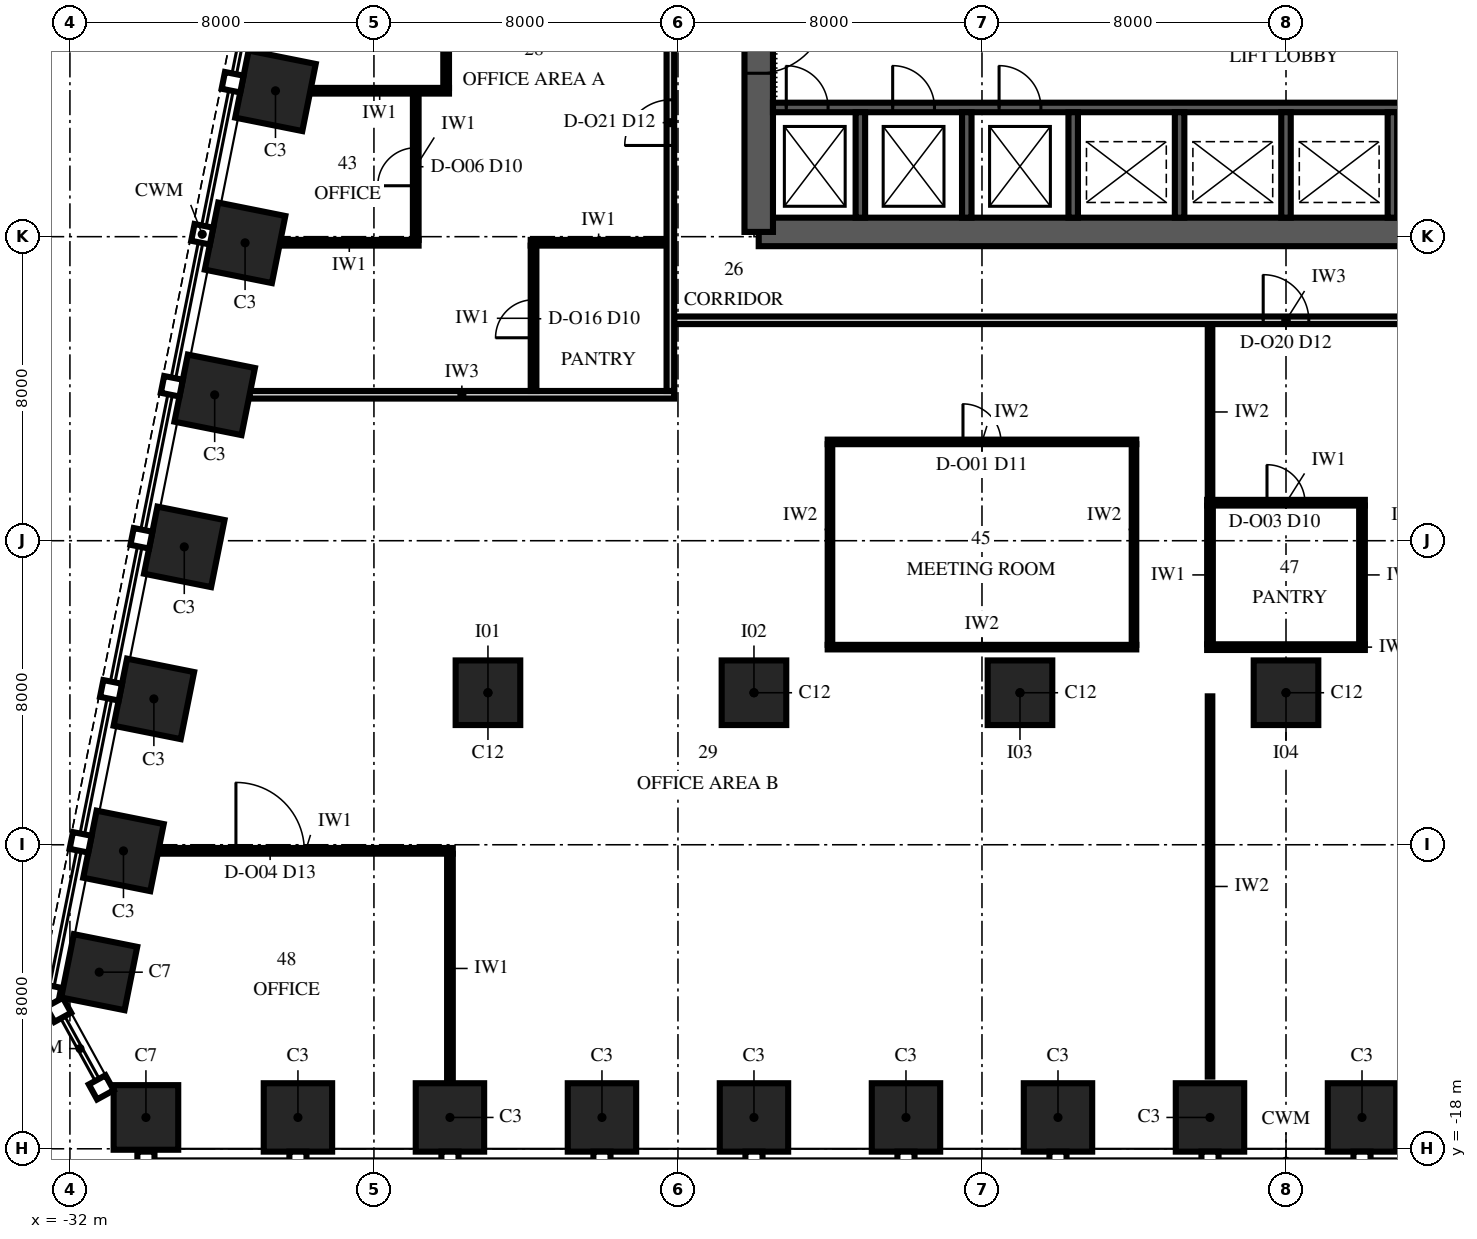
"""IFC4 building model, lengths in metres.
Left out: names, types, materials, properties, quantities, classifications, styles, units other than length and angle.
Written with IfcOpenShell. Run it as: python <this file> out.ifc"""

import sys

from ifc_helpers import new_model, si_unit, direction, frame, frame_2d, origin, origin_2d, place, context, subcontext, project, spatial, polyline, rectangle, outline, extrude, element, fill, save


model = new_model("IFC4")
c1 = context("Model", 3, precision=1e-05, world=origin(), true_north=direction((0.0, 1.0)))
c2 = subcontext(c1, "Body", "Model", "MODEL_VIEW")
j1 = project(units=[si_unit("LENGTHUNIT", "METRE"), si_unit("PLANEANGLEUNIT", "RADIAN")], contexts=[c1])
p1 = place(None, origin())
s1 = spatial("IfcSite", under=j1, at=p1, CompositionType="ELEMENT")
p2 = place(p1, origin())
s2 = spatial("IfcBuilding", under=s1, at=p2, CompositionType="ELEMENT")
p3 = place(p2, frame((0.0, 0.0, 115.0)))
s3 = spatial("IfcBuildingStorey", under=s2, at=p3, CompositionType="ELEMENT", Elevation=115.0)
p4 = place(p3, frame((-30.0, -17.175, 0.0), z_axis=(0.0, 0.0, 1.0), x_axis=(1.0, 0.0, 0.0)))
e1 = element("IfcColumn", 1, at=p4, inside=s3, PredefinedType="COLUMN", context=c2, shape_type="SweptSolid", body=[
    extrude(rectangle(XDim=1.7, YDim=1.7, at=origin_2d()), origin(), (0.0, 0.0, 1.0), 4.0),
])
for number, where, z_axis, x_axis in (
    (2, (-26.0, -17.175, 0.0), (0.0, 0.0, 1.0), (1.0, 0.0, 0.0)),
    (3, (-22.0, -17.175, 0.0), (0.0, 0.0, 1.0), (1.0, 0.0, 0.0)),
    (4, (-18.0, -17.175, 0.0), (0.0, 0.0, 1.0), (1.0, 0.0, 0.0)),
    (5, (-14.0, -17.175, 0.0), (0.0, 0.0, 1.0), (1.0, 0.0, 0.0)),
    (6, (-10.0, -17.175, 0.0), (0.0, 0.0, 1.0), (1.0, 0.0, 0.0)),
    (7, (-6.0, -17.175, 0.0), (0.0, 0.0, 1.0), (1.0, 0.0, 0.0)),
    (8, (-2.0, -17.175, 0.0), (0.0, 0.0, 1.0), (1.0, 0.0, 0.0)),
    (9, (2.0, -17.175, 0.0), (0.0, 0.0, 1.0), (1.0, 0.0, 0.0)),
    (10, (-26.591, 9.838, 0.0), (0.0, 0.0, 1.0), (-0.196, -0.981, 0.0)),
    (11, (-27.391, 5.838, 0.0), (0.0, 0.0, 1.0), (-0.196, -0.981, 0.0)),
    (12, (-28.191, 1.838, 0.0), (0.0, 0.0, 1.0), (-0.196, -0.981, 0.0)),
    (13, (-28.991, -2.162, 0.0), (0.0, 0.0, 1.0), (-0.196, -0.981, 0.0)),
    (14, (-29.791, -6.162, 0.0), (0.0, 0.0, 1.0), (-0.196, -0.981, 0.0)),
    (15, (-30.591, -10.162, 0.0), (0.0, 0.0, 1.0), (-0.196, -0.981, 0.0)),
):
    element("IfcColumn", number, at=place(p3, frame(where, z_axis=z_axis, x_axis=x_axis)), inside=s3, PredefinedType="COLUMN", context=c2, shape_type="SweptSolid", body=[
        extrude(rectangle(XDim=1.8, YDim=1.8, at=origin_2d()), origin(), (0.0, 0.0, 1.0), 4.0),
    ])
for number, where, z_axis, x_axis in (
    (16, (-31.229, -13.353, 0.0), (0.0, 0.0, 1.0), (-0.196, -0.981, 0.0)),
    (17, (-21.0, -6.0, 0.0), (0.0, 0.0, 1.0), (1.0, 0.0, 0.0)),
    (18, (-14.0, -6.0, 0.0), (0.0, 0.0, 1.0), (1.0, 0.0, 0.0)),
    (19, (-7.0, -6.0, 0.0), (0.0, 0.0, 1.0), (1.0, 0.0, 0.0)),
    (20, (0.0, -6.0, 0.0), (0.0, 0.0, 1.0), (1.0, 0.0, 0.0)),
):
    element("IfcColumn", number, at=place(p3, frame(where, z_axis=z_axis, x_axis=x_axis)), inside=s3, PredefinedType="COLUMN", context=c2, shape_type="SweptSolid", body=[
        extrude(rectangle(XDim=1.7, YDim=1.7, at=origin_2d()), origin(), (0.0, 0.0, 1.0), 4.0),
    ])
p5 = place(p3, frame((-13.875, 6.125, 0.0), z_axis=(0.0, 0.0, 1.0), x_axis=(1.0, 0.0, 0.0)))
e21 = element("IfcWall", 21, at=p5, inside=s3, PredefinedType="SHEAR", context=c2, shape_type="SweptSolid", body=[
    extrude(rectangle(XDim=27.75, YDim=0.75, at=frame_2d((13.875, 0.0))), origin(), (0.0, 0.0, 1.0), 4.0),
])
p6 = place(p3, frame((-13.875, 23.875, 0.0), z_axis=(0.0, 0.0, 1.0), x_axis=(0.0, -1.0, 0.0)))
e22 = element("IfcWall", 22, at=p6, inside=s3, PredefinedType="SHEAR", context=c2, shape_type="SweptSolid", body=[
    extrude(outline(polyline([(0.0, -0.375), (17.75, -0.375), (17.75, 0.0), (17.375, 0.0), (17.375, 0.375), (0.375, 0.375), (0.375, 0.0), (0.0, 0.0), (0.0, -0.375)])), origin(), (0.0, 0.0, 1.0), 4.0),
])
p7 = place(p6, frame((11.775, 0.0, 0.0)))
e23 = element("IfcOpeningElement", 23, at=p7, cuts=e22, PredefinedType="OPENING", context=c2, shape_type="SweptSolid", body=[
    extrude(rectangle(XDim=1.8, YDim=2.4, at=frame_2d((0.9, 1.2))), frame((0.0, 0.39, 0.0), z_axis=(0.0, -1.0, 0.0), x_axis=(1.0, 0.0, 0.0)), (0.0, 0.0, 1.0), 0.78),
])
p8 = place(p3, frame((-13.5, 9.4, 0.0), z_axis=(0.0, 0.0, 1.0), x_axis=(1.0, 0.0, 0.0)))
e24 = element("IfcWall", 24, at=p8, inside=s3, PredefinedType="SHEAR", context=c2, shape_type="SweptSolid", body=[
    extrude(rectangle(XDim=27.0, YDim=0.25, at=frame_2d((13.5, 0.0))), origin(), (0.0, 0.0, 1.0), 4.0),
])
p9 = place(p8, frame((0.35, 0.0, 0.0)))
e25 = element("IfcOpeningElement", 25, at=p9, cuts=e24, PredefinedType="OPENING", context=c2, shape_type="SweptSolid", body=[
    extrude(rectangle(XDim=1.1, YDim=2.1, at=frame_2d((0.55, 1.05))), frame((0.0, 0.14, 0.0), z_axis=(0.0, -1.0, 0.0), x_axis=(1.0, 0.0, 0.0)), (0.0, 0.0, 1.0), 0.28),
])
p10 = place(p8, frame((3.15, 0.0, 0.0)))
e26 = element("IfcOpeningElement", 26, at=p10, cuts=e24, PredefinedType="OPENING", context=c2, shape_type="SweptSolid", body=[
    extrude(rectangle(XDim=1.1, YDim=2.1, at=frame_2d((0.55, 1.05))), frame((0.0, 0.14, 0.0), z_axis=(0.0, -1.0, 0.0), x_axis=(1.0, 0.0, 0.0)), (0.0, 0.0, 1.0), 0.28),
])
p11 = place(p8, frame((5.95, 0.0, 0.0)))
e27 = element("IfcOpeningElement", 27, at=p11, cuts=e24, PredefinedType="OPENING", context=c2, shape_type="SweptSolid", body=[
    extrude(rectangle(XDim=1.1, YDim=2.1, at=frame_2d((0.55, 1.05))), frame((0.0, 0.14, 0.0), z_axis=(0.0, -1.0, 0.0), x_axis=(1.0, 0.0, 0.0)), (0.0, 0.0, 1.0), 0.28),
])
for number, where, z_axis, x_axis in (
    (28, (-11.2, 6.5, 0.0), (0.0, 0.0, 1.0), (0.0, 1.0, 0.0)),
    (29, (-8.4, 6.5, 0.0), (0.0, 0.0, 1.0), (0.0, 1.0, 0.0)),
    (30, (-5.6, 6.5, 0.0), (0.0, 0.0, 1.0), (0.0, 1.0, 0.0)),
    (31, (-2.8, 6.5, 0.0), (0.0, 0.0, 1.0), (0.0, 1.0, 0.0)),
    (32, (0.0, 6.5, 0.0), (0.0, 0.0, 1.0), (0.0, 1.0, 0.0)),
    (33, (2.8, 6.5, 0.0), (0.0, 0.0, 1.0), (0.0, 1.0, 0.0)),
):
    element("IfcWall", number, at=place(p3, frame(where, z_axis=z_axis, x_axis=x_axis)), inside=s3, PredefinedType="SHEAR", context=c2, shape_type="SweptSolid", body=[
        extrude(rectangle(XDim=2.775, YDim=0.25, at=frame_2d((1.387, 0.0))), origin(), (0.0, 0.0, 1.0), 4.0),
    ])
p12 = place(p3, frame((-29.673, -10.16, 0.0), z_axis=(0.0, 0.0, 1.0), x_axis=(1.0, 0.0, 0.0)))
e34 = element("IfcWall", 34, at=p12, inside=s3, PredefinedType="PARTITIONING", context=c2, shape_type="SweptSolid", body=[
    extrude(rectangle(XDim=7.748, YDim=0.15, at=frame_2d((3.874, 0.0))), origin(), (0.0, 0.0, 1.0), 3.25),
])
p13 = place(p12, frame((2.041, 0.0, 0.0)))
e35 = element("IfcOpeningElement", 35, at=p13, cuts=e34, PredefinedType="OPENING", context=c2, shape_type="SweptSolid", body=[
    extrude(rectangle(XDim=1.8, YDim=2.4, at=frame_2d((0.9, 1.2))), frame((0.0, 0.09, 0.0), z_axis=(0.0, -1.0, 0.0), x_axis=(1.0, 0.0, 0.0)), (0.0, 0.0, 1.0), 0.18),
])
p14 = place(p3, frame((-12.06, -4.8, 0.0), z_axis=(0.0, 0.0, 1.0), x_axis=(1.0, 0.0, 0.0)))
e36 = element("IfcWall", 36, at=p14, inside=s3, PredefinedType="PARTITIONING", context=c2, shape_type="SweptSolid", body=[
    extrude(rectangle(XDim=8.12, YDim=0.12, at=frame_2d((4.06, 0.0))), origin(), (0.0, 0.0, 1.0), 3.25),
])
p15 = place(p3, frame((-2.075, -4.8, 0.0), z_axis=(0.0, 0.0, 1.0), x_axis=(1.0, 0.0, 0.0)))
e37 = element("IfcWall", 37, at=p15, inside=s3, PredefinedType="PARTITIONING", context=c2, shape_type="SweptSolid", body=[
    extrude(rectangle(XDim=4.15, YDim=0.15, at=frame_2d((2.075, 0.0))), origin(), (0.0, 0.0, 1.0), 3.25),
])
p16 = place(p3, frame((-2.075, -1.0, 0.0), z_axis=(0.0, 0.0, 1.0), x_axis=(1.0, 0.0, 0.0)))
e38 = element("IfcWall", 38, at=p16, inside=s3, PredefinedType="PARTITIONING", context=c2, shape_type="SweptSolid", body=[
    extrude(rectangle(XDim=4.15, YDim=0.15, at=frame_2d((2.075, 0.0))), origin(), (0.0, 0.0, 1.0), 3.85),
])
p17 = place(p16, frame((1.575, 0.0, 0.0)))
e39 = element("IfcOpeningElement", 39, at=p17, cuts=e38, PredefinedType="OPENING", context=c2, shape_type="SweptSolid", body=[
    extrude(rectangle(XDim=1.0, YDim=2.3, at=frame_2d((0.5, 1.15))), frame((0.0, 0.09, 0.0), z_axis=(0.0, -1.0, 0.0), x_axis=(1.0, 0.0, 0.0)), (0.0, 0.0, 1.0), 0.18),
])
p18 = place(p3, frame((-12.06, 0.6, 0.0), z_axis=(0.0, 0.0, 1.0), x_axis=(1.0, 0.0, 0.0)))
e40 = element("IfcWall", 40, at=p18, inside=s3, PredefinedType="PARTITIONING", context=c2, shape_type="SweptSolid", body=[
    extrude(rectangle(XDim=8.12, YDim=0.12, at=frame_2d((4.06, 0.0))), origin(), (0.0, 0.0, 1.0), 3.25),
])
p19 = place(p18, frame((3.56, 0.0, 0.0)))
e41 = element("IfcOpeningElement", 41, at=p19, cuts=e40, PredefinedType="OPENING", context=c2, shape_type="SweptSolid", body=[
    extrude(rectangle(XDim=1.0, YDim=2.4, at=frame_2d((0.5, 1.2))), frame((0.0, 0.075, 0.0), z_axis=(0.0, -1.0, 0.0), x_axis=(1.0, 0.0, 0.0)), (0.0, 0.0, 1.0), 0.15),
])
p20 = place(p3, frame((-27.273, 1.84, 0.0), z_axis=(0.0, 0.0, 1.0), x_axis=(1.0, 0.0, 0.0)))
e42 = element("IfcWall", 42, at=p20, inside=s3, PredefinedType="PARTITIONING", context=c2, shape_type="SweptSolid", body=[
    extrude(rectangle(XDim=11.173, YDim=0.2, at=frame_2d((5.586, 0.0))), origin(), (0.0, 0.0, 1.0), 3.25),
])
p21 = place(p3, frame((-16.1, 3.8, 0.0), z_axis=(0.0, 0.0, 1.0), x_axis=(1.0, 0.0, 0.0)))
e43 = element("IfcWall", 43, at=p21, inside=s3, PredefinedType="PARTITIONING", context=c2, shape_type="SweptSolid", body=[
    extrude(rectangle(XDim=32.2, YDim=0.2, at=frame_2d((16.1, 0.0))), origin(), (0.0, 0.0, 1.0), 3.25),
])
p22 = place(p21, frame((15.5, 0.0, 0.0)))
e44 = element("IfcOpeningElement", 44, at=p22, cuts=e43, PredefinedType="OPENING", context=c2, shape_type="SweptSolid", body=[
    extrude(rectangle(XDim=1.2, YDim=2.4, at=frame_2d((0.6, 1.2))), frame((0.0, 0.115, 0.0), z_axis=(0.0, -1.0, 0.0), x_axis=(1.0, 0.0, 0.0)), (0.0, 0.0, 1.0), 0.23),
])
p23 = place(p3, frame((-26.473, 5.84, 0.0), z_axis=(0.0, 0.0, 1.0), x_axis=(1.0, 0.0, 0.0)))
e45 = element("IfcWall", 45, at=p23, inside=s3, PredefinedType="PARTITIONING", context=c2, shape_type="SweptSolid", body=[
    extrude(rectangle(XDim=3.648, YDim=0.15, at=frame_2d((1.824, 0.0))), origin(), (0.0, 0.0, 1.0), 2.842),
])
p24 = place(p3, frame((-19.875, 5.84, 0.0), z_axis=(0.0, 0.0, 1.0), x_axis=(1.0, 0.0, 0.0)))
e46 = element("IfcWall", 46, at=p24, inside=s3, PredefinedType="PARTITIONING", context=c2, shape_type="SweptSolid", body=[
    extrude(rectangle(XDim=3.575, YDim=0.15, at=frame_2d((1.788, 0.0))), origin(), (0.0, 0.0, 1.0), 3.25),
])
p25 = place(p3, frame((-25.673, 9.84, 0.0), z_axis=(0.0, 0.0, 1.0), x_axis=(1.0, 0.0, 0.0)))
e47 = element("IfcWall", 47, at=p25, inside=s3, PredefinedType="PARTITIONING", context=c2, shape_type="SweptSolid", body=[
    extrude(rectangle(XDim=3.648, YDim=0.15, at=frame_2d((1.824, 0.0))), origin(), (0.0, 0.0, 1.0), 3.25),
])
p26 = place(p3, frame((-22.9, 5.915, 0.0), z_axis=(0.0, 0.0, 1.0), x_axis=(0.0, 1.0, 0.0)))
e48 = element("IfcWall", 48, at=p26, inside=s3, PredefinedType="PARTITIONING", context=c2, shape_type="SweptSolid", body=[
    extrude(rectangle(XDim=3.85, YDim=0.15, at=frame_2d((1.925, 0.0))), origin(), (0.0, 0.0, 1.0), 2.842),
])
p27 = place(p26, frame((1.425, 0.0, 0.0)))
e49 = element("IfcOpeningElement", 49, at=p27, cuts=e48, PredefinedType="OPENING", context=c2, shape_type="SweptSolid", body=[
    extrude(rectangle(XDim=1.0, YDim=2.3, at=frame_2d((0.5, 1.15))), frame((0.0, 0.09, 0.0), z_axis=(0.0, -1.0, 0.0), x_axis=(1.0, 0.0, 0.0)), (0.0, 0.0, 1.0), 0.18),
])
p28 = place(p3, frame((-22.1, 9.915, 0.0), z_axis=(0.0, 0.0, 1.0), x_axis=(0.0, 1.0, 0.0)))
e50 = element("IfcWall", 50, at=p28, inside=s3, PredefinedType="PARTITIONING", context=c2, shape_type="SweptSolid", body=[
    extrude(rectangle(XDim=3.85, YDim=0.15, at=frame_2d((1.925, 0.0))), origin(), (0.0, 0.0, 1.0), 3.85),
])
p29 = place(p28, frame((1.425, 0.0, 0.0)))
e51 = element("IfcOpeningElement", 51, at=p29, cuts=e50, PredefinedType="OPENING", context=c2, shape_type="SweptSolid", body=[
    extrude(rectangle(XDim=1.0, YDim=2.3, at=frame_2d((0.5, 1.15))), frame((0.0, 0.09, 0.0), z_axis=(0.0, -1.0, 0.0), x_axis=(1.0, 0.0, 0.0)), (0.0, 0.0, 1.0), 0.18),
])
p30 = place(p3, frame((-22.0, -16.275, 0.0), z_axis=(0.0, 0.0, 1.0), x_axis=(0.0, 1.0, 0.0)))
e52 = element("IfcWall", 52, at=p30, inside=s3, PredefinedType="PARTITIONING", context=c2, shape_type="SweptSolid", body=[
    extrude(rectangle(XDim=6.04, YDim=0.15, at=frame_2d((3.02, 0.0))), origin(), (0.0, 0.0, 1.0), 3.25),
])
p31 = place(p3, frame((-19.8, 1.94, 0.0), z_axis=(0.0, 0.0, 1.0), x_axis=(0.0, 1.0, 0.0)))
e53 = element("IfcWall", 53, at=p31, inside=s3, PredefinedType="PARTITIONING", context=c2, shape_type="SweptSolid", body=[
    extrude(rectangle(XDim=3.825, YDim=0.15, at=frame_2d((1.913, 0.0))), origin(), (0.0, 0.0, 1.0), 3.85),
])
p32 = place(p31, frame((1.4, 0.0, 0.0)))
e54 = element("IfcOpeningElement", 54, at=p32, cuts=e53, PredefinedType="OPENING", context=c2, shape_type="SweptSolid", body=[
    extrude(rectangle(XDim=1.0, YDim=2.3, at=frame_2d((0.5, 1.15))), frame((0.0, 0.09, 0.0), z_axis=(0.0, -1.0, 0.0), x_axis=(1.0, 0.0, 0.0)), (0.0, 0.0, 1.0), 0.18),
])
p33 = place(p3, frame((-16.2, 1.94, 0.0), z_axis=(0.0, 0.0, 1.0), x_axis=(0.0, 1.0, 0.0)))
e55 = element("IfcWall", 55, at=p33, inside=s3, PredefinedType="PARTITIONING", context=c2, shape_type="SweptSolid", body=[
    extrude(rectangle(XDim=26.335, YDim=0.2, at=frame_2d((13.167, 0.0))), origin(), (0.0, 0.0, 1.0), 2.842),
])
p34 = place(p33, frame((6.46, 0.0, 0.0)))
e56 = element("IfcOpeningElement", 56, at=p34, cuts=e55, PredefinedType="OPENING", context=c2, shape_type="SweptSolid", body=[
    extrude(rectangle(XDim=1.2, YDim=2.4, at=frame_2d((0.6, 1.2))), frame((0.0, 0.115, 0.0), z_axis=(0.0, -1.0, 0.0), x_axis=(1.0, 0.0, 0.0)), (0.0, 0.0, 1.0), 0.23),
])
for number, where, z_axis, x_axis in (
    (57, (-12.0, -4.74, 0.0), (0.0, 0.0, 1.0), (0.0, 1.0, 0.0)),
    (58, (-4.0, -4.74, 0.0), (0.0, 0.0, 1.0), (0.0, 1.0, 0.0)),
):
    element("IfcWall", number, at=place(p3, frame(where, z_axis=z_axis, x_axis=x_axis)), inside=s3, PredefinedType="PARTITIONING", context=c2, shape_type="SweptSolid", body=[
        extrude(rectangle(XDim=5.28, YDim=0.12, at=frame_2d((2.64, 0.0))), origin(), (0.0, 0.0, 1.0), 3.85),
    ])
for number, where, z_axis, x_axis in (
    (59, (-2.0, -4.725, 0.0), (0.0, 0.0, 1.0), (0.0, 1.0, 0.0)),
    (60, (2.0, -4.725, 0.0), (0.0, 0.0, 1.0), (0.0, 1.0, 0.0)),
):
    element("IfcWall", number, at=place(p3, frame(where, z_axis=z_axis, x_axis=x_axis)), inside=s3, PredefinedType="PARTITIONING", context=c2, shape_type="SweptSolid", body=[
        extrude(rectangle(XDim=3.65, YDim=0.15, at=frame_2d((1.825, 0.0))), origin(), (0.0, 0.0, 1.0), 3.25),
    ])
p35 = place(p3, frame((-1.999, -16.1, 0.0), z_axis=(0.0, 0.0, 1.0), x_axis=(0.0, 1.0, 0.0)))
e61 = element("IfcWall", 61, at=p35, inside=s3, PredefinedType="PARTITIONING", context=c2, shape_type="SweptSolid", body=[
    extrude(rectangle(XDim=10.005, YDim=0.12, at=frame_2d((5.002, 0.0))), origin(), (0.0, 0.0, 1.0), 2.842),
])
p36 = place(p3, frame((-1.999, -0.905, 0.0), z_axis=(0.0, 0.0, 1.0), x_axis=(0.0, 1.0, 0.0)))
e62 = element("IfcWall", 62, at=p36, inside=s3, PredefinedType="PARTITIONING", context=c2, shape_type="SweptSolid", body=[
    extrude(rectangle(XDim=4.585, YDim=0.12, at=frame_2d((2.292, 0.0))), origin(), (0.0, 0.0, 1.0), 3.85),
])
p37 = place(p7, origin())
e63 = element("IfcDoor", 63, at=p37, inside=s3, OperationType="DOUBLE_DOOR_SINGLE_SWING", PredefinedType="DOOR", context=c2, shape_type="SweptSolid", body=[
    extrude(rectangle(XDim=1.8, YDim=2.4, at=frame_2d((0.9, 1.2))), frame((0.0, 0.375, 0.0), z_axis=(0.0, -1.0, 0.0), x_axis=(1.0, 0.0, 0.0)), (0.0, 0.0, 1.0), 0.75),
])
fill(e23, e63)
p38 = place(p9, origin())
e64 = element("IfcDoor", 64, at=p38, inside=s3, OperationType="SLIDING_TO_LEFT", PredefinedType="DOOR", context=c2, shape_type="SweptSolid", body=[
    extrude(rectangle(XDim=1.1, YDim=2.1, at=frame_2d((0.55, 1.05))), frame((0.0, 0.125, 0.0), z_axis=(0.0, -1.0, 0.0), x_axis=(1.0, 0.0, 0.0)), (0.0, 0.0, 1.0), 0.25),
])
fill(e25, e64)
p39 = place(p10, origin())
e65 = element("IfcDoor", 65, at=p39, inside=s3, OperationType="SLIDING_TO_LEFT", PredefinedType="DOOR", context=c2, shape_type="SweptSolid", body=[
    extrude(rectangle(XDim=1.1, YDim=2.1, at=frame_2d((0.55, 1.05))), frame((0.0, 0.125, 0.0), z_axis=(0.0, -1.0, 0.0), x_axis=(1.0, 0.0, 0.0)), (0.0, 0.0, 1.0), 0.25),
])
fill(e26, e65)
p40 = place(p11, origin())
e66 = element("IfcDoor", 66, at=p40, inside=s3, OperationType="SLIDING_TO_LEFT", PredefinedType="DOOR", context=c2, shape_type="SweptSolid", body=[
    extrude(rectangle(XDim=1.1, YDim=2.1, at=frame_2d((0.55, 1.05))), frame((0.0, 0.125, 0.0), z_axis=(0.0, -1.0, 0.0), x_axis=(1.0, 0.0, 0.0)), (0.0, 0.0, 1.0), 0.25),
])
fill(e27, e66)
p41 = place(p19, origin())
e67 = element("IfcDoor", 67, at=p41, inside=s3, OperationType="SINGLE_SWING_RIGHT", PredefinedType="DOOR", context=c2, shape_type="SweptSolid", body=[
    extrude(rectangle(XDim=1.0, YDim=2.4, at=frame_2d((0.5, 1.2))), frame((0.0, 0.06, 0.0), z_axis=(0.0, -1.0, 0.0), x_axis=(1.0, 0.0, 0.0)), (0.0, 0.0, 1.0), 0.12),
])
fill(e41, e67)
p42 = place(p17, origin())
e68 = element("IfcDoor", 68, at=p42, inside=s3, OperationType="SINGLE_SWING_LEFT", PredefinedType="DOOR", context=c2, shape_type="SweptSolid", body=[
    extrude(rectangle(XDim=1.0, YDim=2.3, at=frame_2d((0.5, 1.15))), frame((0.0, 0.075, 0.0), z_axis=(0.0, -1.0, 0.0), x_axis=(1.0, 0.0, 0.0)), (0.0, 0.0, 1.0), 0.149),
])
fill(e39, e68)
p43 = place(p13, origin())
e69 = element("IfcDoor", 69, at=p43, inside=s3, OperationType="DOUBLE_DOOR_SINGLE_SWING", PredefinedType="DOOR", context=c2, shape_type="SweptSolid", body=[
    extrude(rectangle(XDim=1.8, YDim=2.4, at=frame_2d((0.9, 1.2))), frame((0.0, 0.075, 0.0), z_axis=(0.0, -1.0, 0.0), x_axis=(1.0, 0.0, 0.0)), (0.0, 0.0, 1.0), 0.149),
])
fill(e35, e69)
p44 = place(p27, origin())
e70 = element("IfcDoor", 70, at=p44, inside=s3, OperationType="SINGLE_SWING_LEFT", PredefinedType="DOOR", context=c2, shape_type="SweptSolid", body=[
    extrude(rectangle(XDim=1.0, YDim=2.3, at=frame_2d((0.5, 1.15))), frame((0.0, 0.075, 0.0), z_axis=(0.0, -1.0, 0.0), x_axis=(1.0, 0.0, 0.0)), (0.0, 0.0, 1.0), 0.149),
])
fill(e49, e70)
p45 = place(p32, origin())
e71 = element("IfcDoor", 71, at=p45, inside=s3, OperationType="SINGLE_SWING_LEFT", PredefinedType="DOOR", context=c2, shape_type="SweptSolid", body=[
    extrude(rectangle(XDim=1.0, YDim=2.3, at=frame_2d((0.5, 1.15))), frame((0.0, 0.075, 0.0), z_axis=(0.0, -1.0, 0.0), x_axis=(1.0, 0.0, 0.0)), (0.0, 0.0, 1.0), 0.149),
])
fill(e54, e71)
p46 = place(p22, origin())
e72 = element("IfcDoor", 72, at=p46, inside=s3, OperationType="SINGLE_SWING_LEFT", PredefinedType="DOOR", context=c2, shape_type="SweptSolid", body=[
    extrude(rectangle(XDim=1.2, YDim=2.4, at=frame_2d((0.6, 1.2))), frame((0.0, 0.1, 0.0), z_axis=(0.0, -1.0, 0.0), x_axis=(1.0, 0.0, 0.0)), (0.0, 0.0, 1.0), 0.199),
])
fill(e44, e72)
p47 = place(p34, origin())
e73 = element("IfcDoor", 73, at=p47, inside=s3, OperationType="SINGLE_SWING_LEFT", PredefinedType="DOOR", context=c2, shape_type="SweptSolid", body=[
    extrude(rectangle(XDim=1.2, YDim=2.4, at=frame_2d((0.6, 1.2))), frame((0.0, 0.1, 0.0), z_axis=(0.0, -1.0, 0.0), x_axis=(1.0, 0.0, 0.0)), (0.0, 0.0, 1.0), 0.199),
])
fill(e56, e73)
save(model, sys.argv[1])
